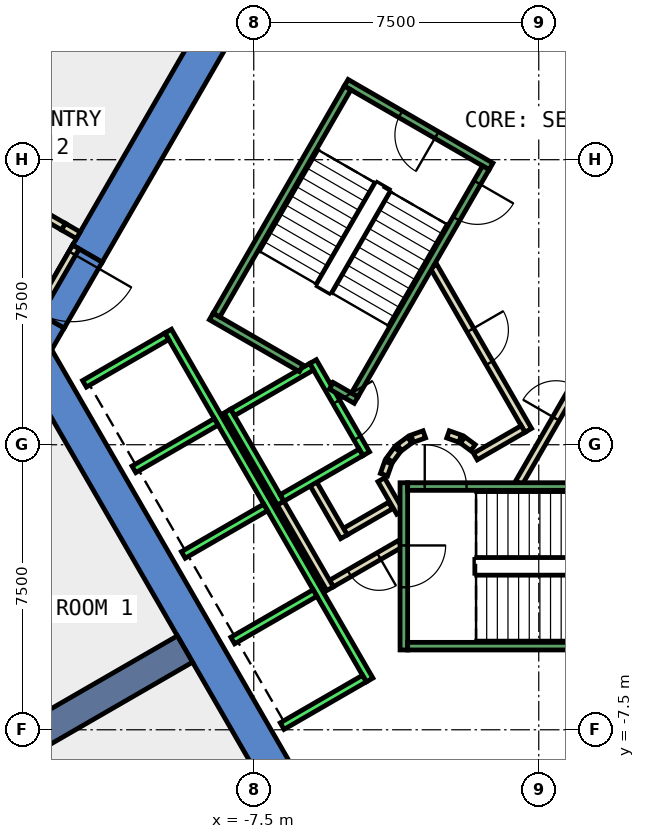
"""IFC4 building model, lengths in metres.
Left out: names, types, materials, properties, quantities, classifications, styles, units other than length and angle.
Written with IfcOpenShell. Run it as: python <this file> out.ifc"""

import sys

from ifc_helpers import new_model, si_unit, direction, frame, frame_2d, origin, place, context, subcontext, project, spatial, polyline, rectangle, outline, extrude, element, fill, save


model = new_model("IFC4")
c1 = context("Model", 3, precision=1e-05, world=origin(), true_north=direction((0.0, 1.0)))
c2 = subcontext(c1, "Body", "Model", "MODEL_VIEW")
j1 = project(units=[si_unit("LENGTHUNIT", "METRE"), si_unit("PLANEANGLEUNIT", "RADIAN")], contexts=[c1])
p1 = place(None, origin())
s1 = spatial("IfcSite", under=j1, at=p1, CompositionType="ELEMENT")
p2 = place(p1, origin())
s2 = spatial("IfcBuilding", under=s1, at=p2, CompositionType="ELEMENT")
p3 = place(p2, frame((0.0, 0.0, 95.0)))
s3 = spatial("IfcBuildingStorey", under=s2, at=p3, CompositionType="ELEMENT", Elevation=95.0)
p4 = place(p3, frame((0.0, 0.0, -0.4)))
e1 = element("IfcWall", 1, at=p4, inside=s3, PredefinedType="SHEAR", context=c2, shape_type="SweptSolid", body=[
    extrude(outline(polyline([(-12.267, 5.252), (-11.488, 4.802), (-6.409, 13.6), (-6.928, 14.5), (-12.267, 5.252)])), origin(), (0.0, 0.0, 1.0), 4.2),
])
p5 = place(p3, frame((0.0, 0.0, -0.4)))
e2 = element("IfcWall", 2, at=p5, inside=s3, PredefinedType="SHEAR", context=c2, shape_type="SweptSolid", body=[
    extrude(outline(polyline([(-12.488, 3.07), (-13.267, 3.52), (-13.856, 2.5), (-12.817, 2.5), (-12.488, 3.07)])), origin(), (0.0, 0.0, 1.0), 4.2),
])
p6 = place(p3, frame((0.0, 0.0, 3.6)))
e3 = element("IfcWall", 3, at=p6, inside=s3, PredefinedType="SHEAR", context=c2, shape_type="SweptSolid", body=[
    extrude(outline(polyline([(-13.267, 3.52), (-12.488, 3.07), (-11.488, 4.802), (-12.267, 5.252), (-13.267, 3.52)])), origin(), (0.0, 0.0, 1.0), 0.2),
])
p7 = place(p3, frame((0.0, 0.0, -0.4)))
e4 = element("IfcWall", 4, at=p7, inside=s3, PredefinedType="SHEAR", context=c2, shape_type="SweptSolid", body=[
    extrude(outline(polyline([(-13.856, 2.5), (-6.928, -9.5), (-6.409, -8.6), (-12.817, 2.5), (-13.856, 2.5)])), origin(), (0.0, 0.0, 1.0), 4.2),
])
p8 = place(p3, frame((-9.31, -5.375, -0.4), z_axis=(0.0, 0.0, 1.0), x_axis=(-0.866017533419, -0.500013631625, 0.0)))
e5 = element("IfcWall", 5, at=p8, inside=s3, PredefinedType="SHEAR", context=c2, shape_type="SweptSolid", body=[
    extrude(rectangle(XDim=9.0, YDim=0.8, at=frame_2d((4.5, 0.0))), origin(), (0.0, 0.0, 1.0), 4.2),
])
p9 = place(p3, frame((-10.797, 14.415, 0.0), z_axis=(0.0, 0.0, 1.0), x_axis=(-0.505008297342, -0.863114488128, 0.0)))
e6 = element("IfcWall", 6, at=p9, inside=s3, PredefinedType="PARTITIONING", context=c2, shape_type="SweptSolid", body=[
    extrude(rectangle(XDim=7.085, YDim=0.2, at=frame_2d((3.542, 0.0))), origin(), (0.0, 0.0, 1.0), 3.8),
])
p10 = place(p9, frame((3.043, 0.0, 0.0)))
e7 = element("IfcOpeningElement", 7, at=p10, cuts=e6, PredefinedType="OPENING", context=c2, shape_type="SweptSolid", body=[
    extrude(rectangle(XDim=1.0, YDim=2.1, at=frame_2d((0.5, 1.05))), frame((0.0, 0.11, 0.0), z_axis=(0.0, -1.0, 0.0), x_axis=(1.0, 0.0, 0.0)), (0.0, 0.0, 1.0), 0.22),
])
p11 = place(p3, frame((-15.098, 7.233, 0.0), z_axis=(0.0, 0.0, 1.0), x_axis=(0.866101363304, -0.499868411168, 0.0)))
e8 = element("IfcWall", 8, at=p11, inside=s3, PredefinedType="PARTITIONING", context=c2, shape_type="SweptSolid", body=[
    extrude(rectangle(XDim=2.992, YDim=0.2, at=frame_2d((1.496, 0.0))), origin(), (0.0, 0.0, 1.0), 3.8),
])
p12 = place(p3, frame((-16.281, 9.4, 0.0), z_axis=(0.0, 0.0, 1.0), x_axis=(0.504973069247, 0.863135099121, 0.0)))
e9 = element("IfcWall", 9, at=p12, inside=s3, PredefinedType="PARTITIONING", context=c2, shape_type="SweptSolid", body=[
    extrude(rectangle(XDim=7.036, YDim=0.2, at=frame_2d((3.518, 0.0))), origin(), (0.0, 0.0, 1.0), 3.8),
])
p13 = place(p3, frame((-3.9, -1.599, 0.0), z_axis=(0.0, 0.0, 1.0), x_axis=(-0.865969445389, -0.500096910261, 0.0)))
e10 = element("IfcWall", 10, at=p13, inside=s3, PredefinedType="PARTITIONING", context=c2, shape_type="SweptSolid", body=[
    extrude(rectangle(XDim=1.373, YDim=0.2, at=frame_2d((0.687, 0.0))), origin(), (0.0, 0.0, 1.0), 3.8),
])
p14 = place(p3, frame((-5.126, -2.422, 0.0), z_axis=(0.0, 0.0, 1.0), x_axis=(-0.500062241894, 0.865989465428, 0.0)))
e11 = element("IfcWall", 11, at=p14, inside=s3, PredefinedType="PARTITIONING", context=c2, shape_type="SweptSolid", body=[
    extrude(rectangle(XDim=1.7, YDim=0.2, at=frame_2d((0.85, 0.0))), origin(), (0.0, 0.0, 1.0), 3.8),
])
p15 = place(p3, frame((-3.65, -2.61, 0.0), z_axis=(0.0, 0.0, 1.0), x_axis=(-0.866072462134, -0.499918483688, 0.0)))
e12 = element("IfcWall", 12, at=p15, inside=s3, PredefinedType="PARTITIONING", context=c2, shape_type="SweptSolid", body=[
    extrude(rectangle(XDim=2.084, YDim=0.2, at=frame_2d((1.042, 0.0))), origin(), (0.0, 0.0, 1.0), 3.8),
])
p16 = place(p15, frame((0.642, 0.0, 0.0)))
e13 = element("IfcOpeningElement", 13, at=p16, cuts=e12, PredefinedType="OPENING", context=c2, shape_type="SweptSolid", body=[
    extrude(rectangle(XDim=0.9, YDim=2.1, at=frame_2d((0.45, 1.05))), frame((0.0, 0.11, 0.0), z_axis=(0.0, -1.0, 0.0), x_axis=(1.0, 0.0, 0.0)), (0.0, 0.0, 1.0), 0.22),
])
p17 = place(p3, frame((-5.492, -3.788, 0.0), z_axis=(0.0, 0.0, 1.0), x_axis=(-0.500008949224, 0.866020236886, 0.0)))
e14 = element("IfcWall", 14, at=p17, inside=s3, PredefinedType="PARTITIONING", context=c2, shape_type="SweptSolid", body=[
    extrude(rectangle(XDim=2.68, YDim=0.2, at=frame_2d((1.34, 0.0))), origin(), (0.0, 0.0, 1.0), 3.8),
])
p18 = place(p3, frame((-4.145, -0.92, 0.0), z_axis=(0.0, 0.0, 1.0), x_axis=(0.499743786207, -0.866173278362, 0.0)))
e15 = element("IfcWall", 15, at=p18, inside=s3, PredefinedType="PARTITIONING", context=c2, shape_type="SweptSolid", body=[
    extrude(rectangle(XDim=0.991, YDim=0.2, at=frame_2d((0.495, 0.0))), origin(), (0.0, 0.0, 1.0), 3.8),
])
p19 = place(p3, frame((-0.52, -1.0, 0.0), z_axis=(0.0, 0.0, 1.0), x_axis=(0.50011622646, 0.865958290007, 0.0)))
e16 = element("IfcWall", 16, at=p19, inside=s3, PredefinedType="PARTITIONING", context=c2, shape_type="SweptSolid", body=[
    extrude(rectangle(XDim=4.991, YDim=0.2, at=frame_2d((2.496, 0.0))), origin(), (0.0, 0.0, 1.0), 3.8),
])
p20 = place(p19, frame((1.945, 0.0, 0.0)))
e17 = element("IfcOpeningElement", 17, at=p20, cuts=e16, PredefinedType="OPENING", context=c2, shape_type="SweptSolid", body=[
    extrude(rectangle(XDim=1.0, YDim=2.1, at=frame_2d((0.5, 1.05))), frame((0.0, 0.11, 0.0), z_axis=(0.0, -1.0, 0.0), x_axis=(1.0, 0.0, 0.0)), (0.0, 0.0, 1.0), 0.22),
])
p21 = place(p3, frame((-2.771, 4.7, 0.0), z_axis=(0.0, 0.0, 1.0), x_axis=(0.499969479948, -0.866043023828, 0.0)))
e18 = element("IfcWall", 18, at=p21, inside=s3, PredefinedType="PARTITIONING", context=c2, shape_type="SweptSolid", body=[
    extrude(rectangle(XDim=4.99, YDim=0.2, at=frame_2d((2.495, 0.0))), origin(), (0.0, 0.0, 1.0), 3.8),
])
p22 = place(p21, frame((1.945, 0.0, 0.0)))
e19 = element("IfcOpeningElement", 19, at=p22, cuts=e18, PredefinedType="OPENING", context=c2, shape_type="SweptSolid", body=[
    extrude(rectangle(XDim=1.0, YDim=2.1, at=frame_2d((0.5, 1.05))), frame((0.0, 0.11, 0.0), z_axis=(0.0, -1.0, 0.0), x_axis=(1.0, 0.0, 0.0)), (0.0, 0.0, 1.0), 0.22),
])
p23 = place(p3, frame((-0.412, 0.414, 0.0), z_axis=(0.0, 0.0, 1.0), x_axis=(-0.866017369001, -0.500013916395, 0.0)))
e20 = element("IfcWall", 20, at=p23, inside=s3, PredefinedType="PARTITIONING", context=c2, shape_type="SweptSolid", body=[
    extrude(rectangle(XDim=1.45, YDim=0.2, at=frame_2d((0.725, 0.0))), origin(), (0.0, 0.0, 1.0), 3.8),
])
p24 = place(p3, frame((-1.731, -0.077, 0.0), z_axis=(0.0, 0.0, 1.0), x_axis=(-0.804311165252, 0.594208338422, 0.0)))
e21 = element("IfcWall", 21, at=p24, inside=s3, PredefinedType="PARTITIONING", context=c2, shape_type="SweptSolid", body=[
    extrude(rectangle(XDim=0.338, YDim=0.2, at=frame_2d((0.169, 0.0))), origin(), (0.0, 0.0, 1.0), 3.8),
])
p25 = place(p3, frame((-2.07, 0.16, 0.0), z_axis=(0.0, 0.0, 1.0), x_axis=(-0.942199461132, 0.335052496547, 0.0)))
e22 = element("IfcWall", 22, at=p25, inside=s3, PredefinedType="PARTITIONING", context=c2, shape_type="SweptSolid", body=[
    extrude(rectangle(XDim=0.337, YDim=0.2, at=frame_2d((0.169, 0.0))), origin(), (0.0, 0.0, 1.0), 3.8),
])
p26 = place(p3, frame((-3.012, 0.273, 0.0), z_axis=(0.0, 0.0, 1.0), x_axis=(-0.942280615813, -0.334824194261, 0.0)))
e23 = element("IfcWall", 23, at=p26, inside=s3, PredefinedType="PARTITIONING", context=c2, shape_type="SweptSolid", body=[
    extrude(rectangle(XDim=0.338, YDim=0.2, at=frame_2d((0.169, 0.0))), origin(), (0.0, 0.0, 1.0), 3.8),
])
p27 = place(p3, frame((-3.397, 0.124, 0.0), z_axis=(0.0, 0.0, 1.0), x_axis=(-0.804311165252, -0.594208338422, 0.0)))
e24 = element("IfcWall", 24, at=p27, inside=s3, PredefinedType="PARTITIONING", context=c2, shape_type="SweptSolid", body=[
    extrude(rectangle(XDim=0.338, YDim=0.2, at=frame_2d((0.169, 0.0))), origin(), (0.0, 0.0, 1.0), 3.8),
])
p28 = place(p3, frame((-3.723, -0.131, 0.0), z_axis=(0.0, 0.0, 1.0), x_axis=(-0.594675113454, -0.803966112121, 0.0)))
e25 = element("IfcWall", 25, at=p28, inside=s3, PredefinedType="PARTITIONING", context=c2, shape_type="SweptSolid", body=[
    extrude(rectangle(XDim=0.338, YDim=0.2, at=frame_2d((0.169, 0.0))), origin(), (0.0, 0.0, 1.0), 3.8),
])
p29 = place(p3, frame((-3.96, -0.47, 0.0), z_axis=(0.0, 0.0, 1.0), x_axis=(-0.334824194261, -0.942280615813, 0.0)))
e26 = element("IfcWall", 26, at=p29, inside=s3, PredefinedType="PARTITIONING", context=c2, shape_type="SweptSolid", body=[
    extrude(rectangle(XDim=0.338, YDim=0.2, at=frame_2d((0.169, 0.0))), origin(), (0.0, 0.0, 1.0), 3.8),
])
p30 = place(p3, frame((-12.18, 5.202, 0.0), z_axis=(0.0, 0.0, 1.0), x_axis=(-0.50002537861, -0.866010750942, 0.0)))
e27 = element("IfcWall", 27, at=p30, inside=s3, PredefinedType="PARTITIONING", context=c2, shape_type="SweptSolid", body=[
    extrude(rectangle(XDim=2.0, YDim=0.2, at=frame_2d((1.0, 0.0))), origin(), (0.0, 0.0, 1.0), 2.4),
])
p31 = place(p30, frame((0.19, 0.0, 0.0)))
e28 = element("IfcOpeningElement", 28, at=p31, cuts=e27, PredefinedType="OPENING", context=c2, shape_type="SweptSolid", body=[
    extrude(rectangle(XDim=1.8, YDim=2.1, at=frame_2d((0.9, 1.05))), frame((0.0, 0.11, 0.0), z_axis=(0.0, -1.0, 0.0), x_axis=(1.0, 0.0, 0.0)), (0.0, 0.0, 1.0), 0.22),
])
p32 = place(p3, frame((-12.506, 5.737, 0.0), z_axis=(0.0, 0.0, 1.0), x_axis=(0.865624510465, -0.500693725627, 0.0)))
e29 = element("IfcWall", 29, at=p32, inside=s3, PredefinedType="PARTITIONING", context=c2, shape_type="SweptSolid", body=[
    extrude(rectangle(XDim=0.449, YDim=0.2, at=frame_2d((0.225, 0.0))), origin(), (0.0, 0.0, 1.0), 2.4),
])
p33 = place(p3, frame((-5.94, 2.188, 0.0), z_axis=(0.0, 0.0, 1.0), x_axis=(0.49994636267, -0.866056369097, 0.0)))
e30 = element("IfcWall", 30, at=p33, inside=s3, PredefinedType="STANDARD", context=c2, shape_type="SweptSolid", body=[
    extrude(rectangle(XDim=2.8, YDim=0.2, at=frame_2d((1.4, 0.0))), origin(), (0.0, 0.0, 1.0), 3.8),
])
p34 = place(p33, frame((1.225, 0.0, 0.0)))
e31 = element("IfcOpeningElement", 31, at=p34, cuts=e30, PredefinedType="OPENING", context=c2, shape_type="SweptSolid", body=[
    extrude(rectangle(XDim=1.1, YDim=2.1, at=frame_2d((0.55, 1.05))), frame((0.0, 0.11, 0.0), z_axis=(0.0, -1.0, 0.0), x_axis=(1.0, 0.0, 0.0)), (0.0, 0.0, 1.0), 0.22),
])
p35 = place(p3, frame((-8.192, 0.888, 0.0), z_axis=(0.0, 0.0, 1.0), x_axis=(0.49994636267, -0.866056369097, 0.0)))
e32 = element("IfcWall", 32, at=p35, inside=s3, PredefinedType="STANDARD", context=c2, shape_type="SweptSolid", body=[
    extrude(rectangle(XDim=2.8, YDim=0.2, at=frame_2d((1.4, 0.0))), origin(), (0.0, 0.0, 1.0), 3.8),
])
for number, where, z_axis, x_axis in (
    (33, (-5.977, 2.052, 0.0), (0.0, 0.0, 1.0), (-0.866, -0.5, 0.0)),
    (34, (-4.677, -0.2, 0.0), (0.0, 0.0, 1.0), (-0.866, -0.5, 0.0)),
):
    element("IfcWall", number, at=place(p3, frame(where, z_axis=z_axis, x_axis=x_axis)), inside=s3, PredefinedType="STANDARD", context=c2, shape_type="SweptSolid", body=[
        extrude(rectangle(XDim=2.399, YDim=0.2, at=frame_2d((1.2, 0.0))), origin(), (0.0, 0.0, 1.0), 3.8),
    ])
p36 = place(p3, frame((-9.751, 2.99, 0.0), z_axis=(0.0, 0.0, 1.0), x_axis=(0.50000090737, -0.866024879913, 0.0)))
e35 = element("IfcWall", 35, at=p36, inside=s3, PredefinedType="STANDARD", context=c2, shape_type="SweptSolid", body=[
    extrude(rectangle(XDim=10.6, YDim=0.2, at=frame_2d((5.3, 0.0))), origin(), (0.0, 0.0, 1.0), 3.8),
])
p37 = place(p3, frame((-9.788, 2.853, 0.0), z_axis=(0.0, 0.0, 1.0), x_axis=(-0.865998541277, -0.500046524342, 0.0)))
e36 = element("IfcWall", 36, at=p37, inside=s3, PredefinedType="STANDARD", context=c2, shape_type="SweptSolid", body=[
    extrude(rectangle(XDim=2.5, YDim=0.2, at=frame_2d((1.25, 0.0))), origin(), (0.0, 0.0, 1.0), 3.8),
])
for number, where, z_axis, x_axis in (
    (37, (-8.488, 0.602, 0.0), (0.0, 0.0, 1.0), (-0.866, -0.5, 0.0)),
    (38, (-7.188, -1.65, 0.0), (0.0, 0.0, 1.0), (-0.866, -0.5, 0.0)),
    (39, (-5.888, -3.902, 0.0), (0.0, 0.0, 1.0), (-0.866, -0.5, 0.0)),
    (40, (-4.588, -6.153, 0.0), (0.0, 0.0, 1.0), (-0.866, -0.5, 0.0)),
):
    element("IfcWall", number, at=place(p3, frame(where, z_axis=z_axis, x_axis=x_axis)), inside=s3, PredefinedType="STANDARD", context=c2, shape_type="SweptSolid", body=[
        extrude(rectangle(XDim=2.5, YDim=0.2, at=frame_2d((1.25, 0.0))), origin(), (0.0, 0.0, 1.0), 3.8),
    ])
p38 = place(p3, frame((-3.55, -1.0, 0.0), z_axis=(0.0, 0.0, 1.0), x_axis=(0.0, -1.0, 0.0)))
e41 = element("IfcWall", 41, at=p38, inside=s3, PredefinedType="STANDARD", context=c2, shape_type="SweptSolid", body=[
    extrude(rectangle(XDim=4.4, YDim=0.2, at=frame_2d((2.2, 0.0))), origin(), (0.0, 0.0, 1.0), 3.8),
])
p39 = place(p38, frame((1.65, 0.0, 0.0)))
e42 = element("IfcOpeningElement", 42, at=p39, cuts=e41, PredefinedType="OPENING", context=c2, shape_type="SweptSolid", body=[
    extrude(rectangle(XDim=1.1, YDim=2.2, at=frame_2d((0.55, 1.1))), frame((0.0, 0.11, 0.0), z_axis=(0.0, -1.0, 0.0), x_axis=(1.0, 0.0, 0.0)), (0.0, 0.0, 1.0), 0.22),
])
p40 = place(p3, frame((-3.45, -1.1, 0.0), z_axis=(0.0, 0.0, 1.0), x_axis=(1.0, 0.0, 0.0)))
e43 = element("IfcWall", 43, at=p40, inside=s3, PredefinedType="STANDARD", context=c2, shape_type="SweptSolid", body=[
    extrude(rectangle(XDim=6.9, YDim=0.2, at=frame_2d((3.45, 0.0))), origin(), (0.0, 0.0, 1.0), 3.8),
])
p41 = place(p40, frame((0.45, 0.0, 0.0)))
e44 = element("IfcOpeningElement", 44, at=p41, cuts=e43, PredefinedType="OPENING", context=c2, shape_type="SweptSolid", body=[
    extrude(rectangle(XDim=1.1, YDim=2.2, at=frame_2d((0.55, 1.1))), frame((0.0, 0.11, 0.0), z_axis=(0.0, -1.0, 0.0), x_axis=(1.0, 0.0, 0.0)), (0.0, 0.0, 1.0), 0.22),
])
p42 = place(p3, frame((-3.45, -5.3, 0.0), z_axis=(0.0, 0.0, 1.0), x_axis=(1.0, 0.0, 0.0)))
e45 = element("IfcWall", 45, at=p42, inside=s3, PredefinedType="STANDARD", context=c2, shape_type="SweptSolid", body=[
    extrude(rectangle(XDim=6.9, YDim=0.2, at=frame_2d((3.45, 0.0))), origin(), (0.0, 0.0, 1.0), 3.8),
])
p43 = place(p3, frame((-1.256, 7.324, 0.0), z_axis=(0.0, 0.0, 1.0), x_axis=(-0.866046073146, 0.499964197906, 0.0)))
e46 = element("IfcWall", 46, at=p43, inside=s3, PredefinedType="STANDARD", context=c2, shape_type="SweptSolid", body=[
    extrude(rectangle(XDim=4.4, YDim=0.2, at=frame_2d((2.2, 0.0))), origin(), (0.0, 0.0, 1.0), 3.8),
])
p44 = place(p43, frame((1.65, 0.0, 0.0)))
e47 = element("IfcOpeningElement", 47, at=p44, cuts=e46, PredefinedType="OPENING", context=c2, shape_type="SweptSolid", body=[
    extrude(rectangle(XDim=1.1, YDim=2.2, at=frame_2d((0.55, 1.1))), frame((0.0, 0.11, 0.0), z_axis=(0.0, -1.0, 0.0), x_axis=(1.0, 0.0, 0.0)), (0.0, 0.0, 1.0), 0.22),
])
p45 = place(p3, frame((-6.25, 2.01, 0.0), z_axis=(0.0, 0.0, 1.0), x_axis=(-0.86611865017, 0.499838457731, 0.0)))
e48 = element("IfcWall", 48, at=p45, inside=s3, PredefinedType="STANDARD", context=c2, shape_type="SweptSolid", body=[
    extrude(rectangle(XDim=2.733, YDim=0.2, at=frame_2d((1.366, 0.0))), origin(), (0.0, 0.0, 1.0), 3.8),
])
p46 = place(p3, frame((-4.806, 1.176, 0.0), z_axis=(0.0, 0.0, 1.0), x_axis=(-0.866558586415, 0.499075361355, 0.0)))
e49 = element("IfcWall", 49, at=p46, inside=s3, PredefinedType="STANDARD", context=c2, shape_type="SweptSolid", body=[
    extrude(rectangle(XDim=0.751, YDim=0.2, at=frame_2d((0.376, 0.0))), origin(), (0.0, 0.0, 1.0), 3.8),
])
p47 = place(p3, frame((-1.393, 7.288, 0.0), z_axis=(0.0, 0.0, 1.0), x_axis=(-0.499963383562, -0.866046543262, 0.0)))
e50 = element("IfcWall", 50, at=p47, inside=s3, PredefinedType="STANDARD", context=c2, shape_type="SweptSolid", body=[
    extrude(rectangle(XDim=6.9, YDim=0.2, at=frame_2d((3.45, 0.0))), origin(), (0.0, 0.0, 1.0), 3.8),
])
p48 = place(p47, frame((0.45, 0.0, 0.0)))
e51 = element("IfcOpeningElement", 51, at=p48, cuts=e50, PredefinedType="OPENING", context=c2, shape_type="SweptSolid", body=[
    extrude(rectangle(XDim=1.1, YDim=2.2, at=frame_2d((0.55, 1.1))), frame((0.0, 0.11, 0.0), z_axis=(0.0, -1.0, 0.0), x_axis=(1.0, 0.0, 0.0)), (0.0, 0.0, 1.0), 0.22),
])
p49 = place(p3, frame((-5.03, 9.388, 0.0), z_axis=(0.0, 0.0, 1.0), x_axis=(-0.499978703459, -0.866037698999, 0.0)))
e52 = element("IfcWall", 52, at=p49, inside=s3, PredefinedType="STANDARD", context=c2, shape_type="SweptSolid", body=[
    extrude(rectangle(XDim=6.9, YDim=0.2, at=frame_2d((3.45, 0.0))), origin(), (0.0, 0.0, 1.0), 3.8),
])
p50 = place(p20, origin())
e53 = element("IfcDoor", 53, at=p50, inside=s3, OperationType="SINGLE_SWING_LEFT", PredefinedType="DOOR", context=c2, shape_type="SweptSolid", body=[
    extrude(rectangle(XDim=1.0, YDim=2.1, at=frame_2d((0.5, 1.05))), frame((0.0, 0.025, 0.0), z_axis=(0.0, -1.0, 0.0), x_axis=(1.0, 0.0, 0.0)), (0.0, 0.0, 1.0), 0.05),
])
fill(e17, e53)
p51 = place(p22, origin())
e54 = element("IfcDoor", 54, at=p51, inside=s3, OperationType="SINGLE_SWING_RIGHT", PredefinedType="DOOR", context=c2, shape_type="SweptSolid", body=[
    extrude(rectangle(XDim=1.0, YDim=2.1, at=frame_2d((0.5, 1.05))), frame((0.0, 0.025, 0.0), z_axis=(0.0, -1.0, 0.0), x_axis=(1.0, 0.0, 0.0)), (0.0, 0.0, 1.0), 0.05),
])
fill(e19, e54)
p52 = place(p16, origin())
e55 = element("IfcDoor", 55, at=p52, inside=s3, OperationType="SINGLE_SWING_LEFT", PredefinedType="DOOR", context=c2, shape_type="SweptSolid", body=[
    extrude(rectangle(XDim=0.9, YDim=2.1, at=frame_2d((0.45, 1.05))), frame((0.0, 0.025, 0.0), z_axis=(0.0, -1.0, 0.0), x_axis=(1.0, 0.0, 0.0)), (0.0, 0.0, 1.0), 0.05),
])
fill(e13, e55)
p53 = place(p31, origin())
e56 = element("IfcDoor", 56, at=p53, inside=s3, OperationType="DOUBLE_DOOR_SINGLE_SWING", PredefinedType="DOOR", context=c2, shape_type="SweptSolid", body=[
    extrude(rectangle(XDim=1.8, YDim=2.1, at=frame_2d((0.9, 1.05))), frame((0.0, 0.025, 0.0), z_axis=(0.0, -1.0, 0.0), x_axis=(1.0, 0.0, 0.0)), (0.0, 0.0, 1.0), 0.05),
])
fill(e28, e56)
p54 = place(p34, origin())
e57 = element("IfcDoor", 57, at=p54, inside=s3, OperationType="SLIDING_TO_LEFT", PredefinedType="DOOR", context=c2, shape_type="SweptSolid", body=[
    extrude(rectangle(XDim=1.1, YDim=2.1, at=frame_2d((0.55, 1.05))), frame((0.0, 0.025, 0.0), z_axis=(0.0, -1.0, 0.0), x_axis=(1.0, 0.0, 0.0)), (0.0, 0.0, 1.0), 0.05),
])
fill(e31, e57)
p55 = place(p41, origin())
e58 = element("IfcDoor", 58, at=p55, inside=s3, OperationType="SINGLE_SWING_LEFT", PredefinedType="DOOR", context=c2, shape_type="SweptSolid", body=[
    extrude(rectangle(XDim=1.1, YDim=2.2, at=frame_2d((0.55, 1.1))), frame((0.0, 0.025, 0.0), z_axis=(0.0, -1.0, 0.0), x_axis=(1.0, 0.0, 0.0)), (0.0, 0.0, 1.0), 0.05),
])
fill(e44, e58)
p56 = place(p39, origin())
e59 = element("IfcDoor", 59, at=p56, inside=s3, OperationType="SINGLE_SWING_LEFT", PredefinedType="DOOR", context=c2, shape_type="SweptSolid", body=[
    extrude(rectangle(XDim=1.1, YDim=2.2, at=frame_2d((0.55, 1.1))), frame((0.0, 0.025, 0.0), z_axis=(0.0, -1.0, 0.0), x_axis=(1.0, 0.0, 0.0)), (0.0, 0.0, 1.0), 0.05),
])
fill(e42, e59)
p57 = place(p48, origin())
e60 = element("IfcDoor", 60, at=p57, inside=s3, OperationType="SINGLE_SWING_LEFT", PredefinedType="DOOR", context=c2, shape_type="SweptSolid", body=[
    extrude(rectangle(XDim=1.1, YDim=2.2, at=frame_2d((0.55, 1.1))), frame((0.0, 0.025, 0.0), z_axis=(0.0, -1.0, 0.0), x_axis=(1.0, 0.0, 0.0)), (0.0, 0.0, 1.0), 0.05),
])
fill(e51, e60)
p58 = place(p44, origin())
e61 = element("IfcDoor", 61, at=p58, inside=s3, OperationType="SINGLE_SWING_LEFT", PredefinedType="DOOR", context=c2, shape_type="SweptSolid", body=[
    extrude(rectangle(XDim=1.1, YDim=2.2, at=frame_2d((0.55, 1.1))), frame((0.0, 0.025, 0.0), z_axis=(0.0, -1.0, 0.0), x_axis=(1.0, 0.0, 0.0)), (0.0, 0.0, 1.0), 0.05),
])
fill(e47, e61)
save(model, sys.argv[1])
